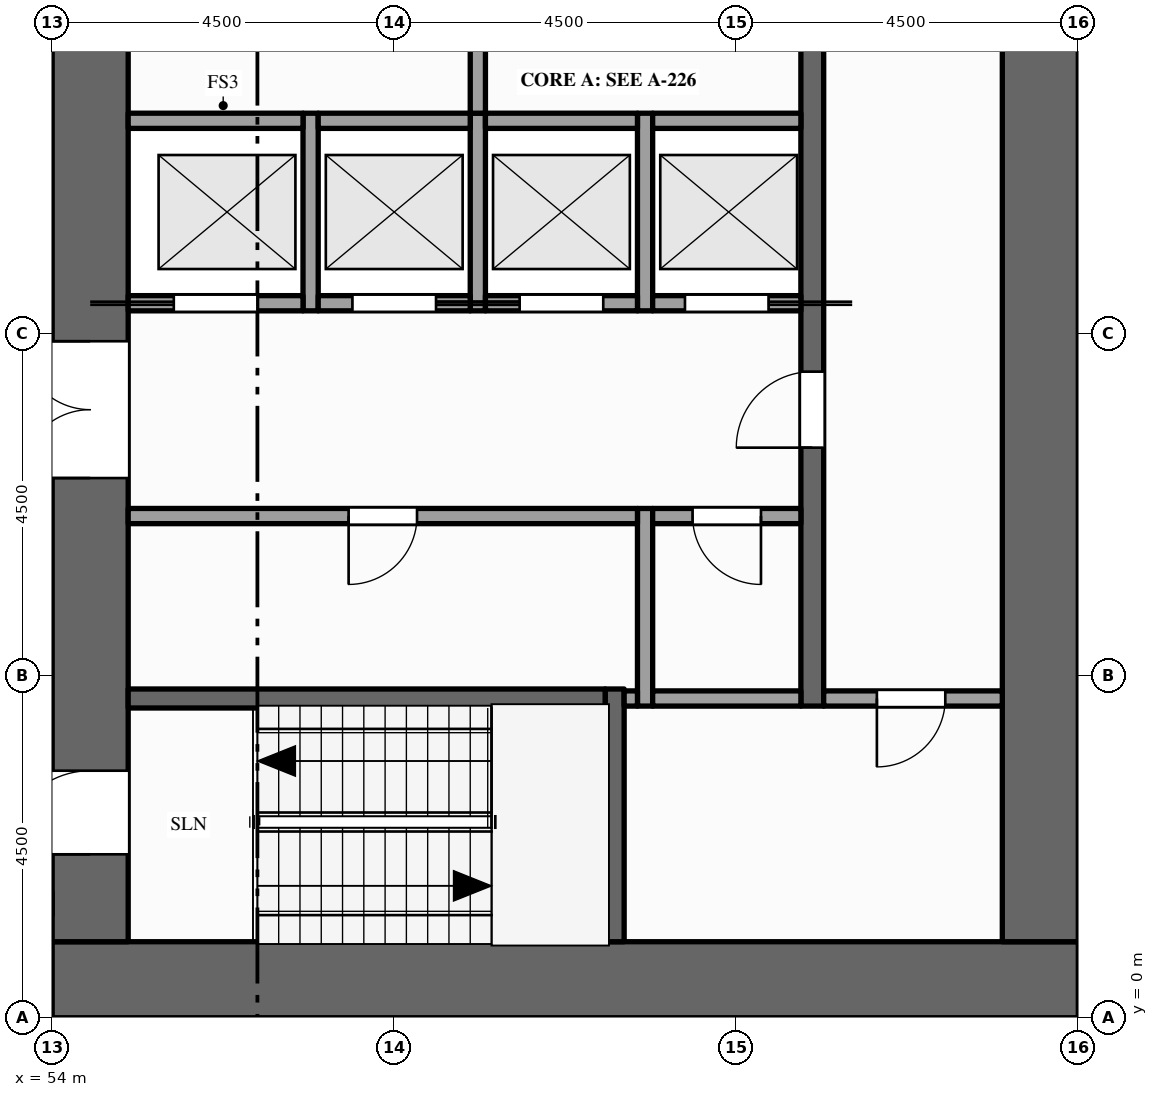
"""IFC4 building model, lengths in metres.
Left out: names, types, materials, properties, quantities, classifications, styles, units other than length and angle.
Written with IfcOpenShell. Run it as: python <this file> out.ifc"""

import sys

from ifc_helpers import new_model, si_unit, direction, frame, frame_2d, origin, place, context, subcontext, project, spatial, rectangle, extrude, element, fill, save


model = new_model("IFC4")
c1 = context("Model", 3, precision=1e-05, world=origin(), true_north=direction((0.0, 1.0)))
c2 = subcontext(c1, "Body", "Model", "MODEL_VIEW")
j1 = project(units=[si_unit("LENGTHUNIT", "METRE"), si_unit("PLANEANGLEUNIT", "RADIAN")], contexts=[c1])
p1 = place(None, origin())
s1 = spatial("IfcSite", under=j1, at=p1, CompositionType="ELEMENT")
p2 = place(p1, origin())
s2 = spatial("IfcBuilding", under=s1, at=p2, CompositionType="ELEMENT")
p3 = place(p2, frame((0.0, 0.0, 143.0)))
s3 = spatial("IfcBuildingStorey", under=s2, at=p3, CompositionType="ELEMENT", Elevation=143.0)
p4 = place(p3, frame((67.5, 0.5, -0.15), z_axis=(0.0, 0.0, 1.0), x_axis=(-1.0, 0.0, 0.0)))
e1 = element("IfcWall", 1, at=p4, inside=s3, PredefinedType="SHEAR", context=c2, shape_type="SweptSolid", body=[
    extrude(rectangle(XDim=13.5, YDim=1.0, at=frame_2d((6.75, 0.0))), origin(), (0.0, 0.0, 1.0), 4.0),
])
p5 = place(p3, frame((54.5, 1.0, -0.15), z_axis=(0.0, 0.0, 1.0), x_axis=(0.0, 1.0, 0.0)))
e2 = element("IfcWall", 2, at=p5, inside=s3, PredefinedType="SHEAR", context=c2, shape_type="SweptSolid", body=[
    extrude(rectangle(XDim=20.5, YDim=1.0, at=frame_2d((10.25, 0.0))), origin(), (0.0, 0.0, 1.0), 4.0),
])
p6 = place(p5, frame((6.1, 0.0, 0.15)))
e3 = element("IfcOpeningElement", 3, at=p6, cuts=e2, PredefinedType="OPENING", context=c2, shape_type="SweptSolid", body=[
    extrude(rectangle(XDim=1.8, YDim=2.1, at=frame_2d((0.9, 1.05))), frame((0.0, 0.51, 0.0), z_axis=(0.0, -1.0, 0.0), x_axis=(1.0, 0.0, 0.0)), (0.0, 0.0, 1.0), 1.02),
])
p7 = place(p5, frame((12.15, 0.0, 0.15)))
e4 = element("IfcOpeningElement", 4, at=p7, cuts=e2, PredefinedType="OPENING", context=c2, shape_type="SweptSolid", body=[
    extrude(rectangle(XDim=1.1, YDim=2.1, at=frame_2d((0.55, 1.05))), frame((0.0, 0.51, 0.0), z_axis=(0.0, -1.0, 0.0), x_axis=(1.0, 0.0, 0.0)), (0.0, 0.0, 1.0), 1.02),
])
p8 = place(p5, frame((1.15, 0.0, 0.15)))
e5 = element("IfcOpeningElement", 5, at=p8, cuts=e2, PredefinedType="OPENING", context=c2, shape_type="SweptSolid", body=[
    extrude(rectangle(XDim=1.1, YDim=2.1, at=frame_2d((0.55, 1.05))), frame((0.0, 0.51, 0.0), z_axis=(0.0, -1.0, 0.0), x_axis=(1.0, 0.0, 0.0)), (0.0, 0.0, 1.0), 1.02),
])
p9 = place(p5, frame((18.35, 0.0, 0.15)))
e6 = element("IfcOpeningElement", 6, at=p9, cuts=e2, PredefinedType="OPENING", context=c2, shape_type="SweptSolid", body=[
    extrude(rectangle(XDim=1.1, YDim=2.1, at=frame_2d((0.55, 1.05))), frame((0.0, 0.51, 0.0), z_axis=(0.0, -1.0, 0.0), x_axis=(1.0, 0.0, 0.0)), (0.0, 0.0, 1.0), 1.02),
])
p10 = place(p3, frame((67.0, 1.0, -0.15), z_axis=(0.0, 0.0, 1.0), x_axis=(0.0, 1.0, 0.0)))
e7 = element("IfcWall", 7, at=p10, inside=s3, PredefinedType="SHEAR", context=c2, shape_type="SweptSolid", body=[
    extrude(rectangle(XDim=20.5, YDim=1.0, at=frame_2d((10.25, 0.0))), origin(), (0.0, 0.0, 1.0), 4.0),
])
for number, where, z_axis, x_axis in (
    (8, (57.4, 9.3, 0.0), (0.0, 0.0, 1.0), (0.0, 1.0, 0.0)),
    (9, (59.6, 9.3, 0.0), (0.0, 0.0, 1.0), (0.0, 1.0, 0.0)),
):
    element("IfcWall", number, at=place(p3, frame(where, z_axis=z_axis, x_axis=x_axis)), inside=s3, PredefinedType="SOLIDWALL", context=c2, shape_type="SweptSolid", body=[
        extrude(rectangle(XDim=2.6, YDim=0.2, at=frame_2d((1.3, 0.0))), origin(), (0.0, 0.0, 1.0), 3.85),
    ])
p11 = place(p3, frame((59.6, 11.9, 0.0), z_axis=(0.0, 0.0, 1.0), x_axis=(0.0, 1.0, 0.0)))
e10 = element("IfcWall", 10, at=p11, inside=s3, PredefinedType="PARTITIONING", context=c2, shape_type="SweptSolid", body=[
    extrude(rectangle(XDim=3.6, YDim=0.2, at=frame_2d((1.8, 0.0))), origin(), (0.0, 0.0, 1.0), 3.85),
])
p12 = place(p11, frame((1.3, 0.0, 0.0)))
e11 = element("IfcOpeningElement", 11, at=p12, cuts=e10, PredefinedType="OPENING", context=c2, shape_type="SweptSolid", body=[
    extrude(rectangle(XDim=1.0, YDim=2.1, at=frame_2d((0.5, 1.05))), frame((0.0, 0.11, 0.0), z_axis=(0.0, -1.0, 0.0), x_axis=(1.0, 0.0, 0.0)), (0.0, 0.0, 1.0), 0.22),
])
p13 = place(p3, frame((61.4, 1.0, 0.0), z_axis=(0.0, 0.0, 1.0), x_axis=(0.0, 1.0, 0.0)))
e12 = element("IfcWall", 12, at=p13, inside=s3, PredefinedType="SHEAR", context=c2, shape_type="SweptSolid", body=[
    extrude(rectangle(XDim=3.325, YDim=0.25, at=frame_2d((1.663, 0.0))), origin(), (0.0, 0.0, 1.0), 3.85),
])
p14 = place(p3, frame((61.8, 4.1, 0.0), z_axis=(0.0, 0.0, 1.0), x_axis=(0.0, 1.0, 0.0)))
e13 = element("IfcWall", 13, at=p14, inside=s3, PredefinedType="PARTITIONING", context=c2, shape_type="SweptSolid", body=[
    extrude(rectangle(XDim=2.6, YDim=0.2, at=frame_2d((1.3, 0.0))), origin(), (0.0, 0.0, 1.0), 3.85),
])
p15 = place(p3, frame((61.8, 9.3, 0.0), z_axis=(0.0, 0.0, 1.0), x_axis=(0.0, 1.0, 0.0)))
e14 = element("IfcWall", 14, at=p15, inside=s3, PredefinedType="SOLIDWALL", context=c2, shape_type="SweptSolid", body=[
    extrude(rectangle(XDim=2.6, YDim=0.2, at=frame_2d((1.3, 0.0))), origin(), (0.0, 0.0, 1.0), 3.85),
])
p16 = place(p3, frame((64.0, 4.1, 0.0), z_axis=(0.0, 0.0, 1.0), x_axis=(0.0, 1.0, 0.0)))
e15 = element("IfcWall", 15, at=p16, inside=s3, PredefinedType="SHEAR", context=c2, shape_type="SweptSolid", body=[
    extrude(rectangle(XDim=14.5, YDim=0.3, at=frame_2d((7.25, 0.0))), origin(), (0.0, 0.0, 1.0), 3.85),
])
p17 = place(p16, frame((3.4, 0.0, 0.0)))
e16 = element("IfcOpeningElement", 16, at=p17, cuts=e15, PredefinedType="OPENING", context=c2, shape_type="SweptSolid", body=[
    extrude(rectangle(XDim=1.0, YDim=2.1, at=frame_2d((0.5, 1.05))), frame((0.0, 0.16, 0.0), z_axis=(0.0, -1.0, 0.0), x_axis=(1.0, 0.0, 0.0)), (0.0, 0.0, 1.0), 0.32),
])
p18 = place(p16, frame((9.1, 0.0, 0.0)))
e17 = element("IfcOpeningElement", 17, at=p18, cuts=e15, PredefinedType="OPENING", context=c2, shape_type="SweptSolid", body=[
    extrude(rectangle(XDim=1.0, YDim=2.1, at=frame_2d((0.5, 1.05))), frame((0.0, 0.16, 0.0), z_axis=(0.0, -1.0, 0.0), x_axis=(1.0, 0.0, 0.0)), (0.0, 0.0, 1.0), 0.32),
])
p19 = place(p3, frame((55.0, 4.2, 0.0), z_axis=(0.0, 0.0, 1.0), x_axis=(1.0, 0.0, 0.0)))
e18 = element("IfcWall", 18, at=p19, inside=s3, PredefinedType="SHEAR", context=c2, shape_type="SweptSolid", body=[
    extrude(rectangle(XDim=6.275, YDim=0.25, at=frame_2d((3.137, 0.0))), origin(), (0.0, 0.0, 1.0), 3.85),
])
p20 = place(p3, frame((61.525, 4.2, 0.0), z_axis=(0.0, 0.0, 1.0), x_axis=(1.0, 0.0, 0.0)))
e19 = element("IfcWall", 19, at=p20, inside=s3, PredefinedType="PARTITIONING", context=c2, shape_type="SweptSolid", body=[
    extrude(rectangle(XDim=0.175, YDim=0.2, at=frame_2d((0.087, 0.0))), origin(), (0.0, 0.0, 1.0), 3.85),
])
p21 = place(p3, frame((61.9, 4.2, 0.0), z_axis=(0.0, 0.0, 1.0), x_axis=(1.0, 0.0, 0.0)))
e20 = element("IfcWall", 20, at=p21, inside=s3, PredefinedType="PARTITIONING", context=c2, shape_type="SweptSolid", body=[
    extrude(rectangle(XDim=1.95, YDim=0.2, at=frame_2d((0.975, 0.0))), origin(), (0.0, 0.0, 1.0), 3.85),
])
p22 = place(p3, frame((64.15, 4.2, 0.0), z_axis=(0.0, 0.0, 1.0), x_axis=(1.0, 0.0, 0.0)))
e21 = element("IfcWall", 21, at=p22, inside=s3, PredefinedType="PARTITIONING", context=c2, shape_type="SweptSolid", body=[
    extrude(rectangle(XDim=2.35, YDim=0.2, at=frame_2d((1.175, 0.0))), origin(), (0.0, 0.0, 1.0), 3.85),
])
p23 = place(p22, frame((0.7, 0.0, 0.0)))
e22 = element("IfcOpeningElement", 22, at=p23, cuts=e21, PredefinedType="OPENING", context=c2, shape_type="SweptSolid", body=[
    extrude(rectangle(XDim=0.9, YDim=2.1, at=frame_2d((0.45, 1.05))), frame((0.0, 0.11, 0.0), z_axis=(0.0, -1.0, 0.0), x_axis=(1.0, 0.0, 0.0)), (0.0, 0.0, 1.0), 0.22),
])
p24 = place(p3, frame((55.0, 6.6, 0.0), z_axis=(0.0, 0.0, 1.0), x_axis=(1.0, 0.0, 0.0)))
e23 = element("IfcWall", 23, at=p24, inside=s3, PredefinedType="PARTITIONING", context=c2, shape_type="SweptSolid", body=[
    extrude(rectangle(XDim=6.7, YDim=0.2, at=frame_2d((3.35, 0.0))), origin(), (0.0, 0.0, 1.0), 3.85),
])
p25 = place(p24, frame((2.9, 0.0, 0.0)))
e24 = element("IfcOpeningElement", 24, at=p25, cuts=e23, PredefinedType="OPENING", context=c2, shape_type="SweptSolid", body=[
    extrude(rectangle(XDim=0.9, YDim=2.1, at=frame_2d((0.45, 1.05))), frame((0.0, 0.11, 0.0), z_axis=(0.0, -1.0, 0.0), x_axis=(1.0, 0.0, 0.0)), (0.0, 0.0, 1.0), 0.22),
])
p26 = place(p3, frame((61.9, 6.6, 0.0), z_axis=(0.0, 0.0, 1.0), x_axis=(1.0, 0.0, 0.0)))
e25 = element("IfcWall", 25, at=p26, inside=s3, PredefinedType="PARTITIONING", context=c2, shape_type="SweptSolid", body=[
    extrude(rectangle(XDim=1.95, YDim=0.2, at=frame_2d((0.975, 0.0))), origin(), (0.0, 0.0, 1.0), 3.85),
])
p27 = place(p26, frame((0.525, 0.0, 0.0)))
e26 = element("IfcOpeningElement", 26, at=p27, cuts=e25, PredefinedType="OPENING", context=c2, shape_type="SweptSolid", body=[
    extrude(rectangle(XDim=0.9, YDim=2.1, at=frame_2d((0.45, 1.05))), frame((0.0, 0.11, 0.0), z_axis=(0.0, -1.0, 0.0), x_axis=(1.0, 0.0, 0.0)), (0.0, 0.0, 1.0), 0.22),
])
p28 = place(p3, frame((55.0, 9.4, 0.0), z_axis=(0.0, 0.0, 1.0), x_axis=(1.0, 0.0, 0.0)))
e27 = element("IfcWall", 27, at=p28, inside=s3, PredefinedType="SOLIDWALL", context=c2, shape_type="SweptSolid", body=[
    extrude(rectangle(XDim=2.3, YDim=0.2, at=frame_2d((1.15, 0.0))), origin(), (0.0, 0.0, 1.0), 3.85),
])
p29 = place(p28, frame((0.6, 0.0, 0.012)))
e28 = element("IfcOpeningElement", 28, at=p29, cuts=e27, PredefinedType="OPENING", context=c2, shape_type="SweptSolid", body=[
    extrude(rectangle(XDim=1.1, YDim=2.1, at=frame_2d((0.55, 1.05))), frame((0.0, 0.11, 0.0), z_axis=(0.0, -1.0, 0.0), x_axis=(1.0, 0.0, 0.0)), (0.0, 0.0, 1.0), 0.22),
])
p30 = place(p3, frame((57.5, 9.4, 0.0), z_axis=(0.0, 0.0, 1.0), x_axis=(1.0, 0.0, 0.0)))
e29 = element("IfcWall", 29, at=p30, inside=s3, PredefinedType="SOLIDWALL", context=c2, shape_type="SweptSolid", body=[
    extrude(rectangle(XDim=2.0, YDim=0.2, at=frame_2d((1.0, 0.0))), origin(), (0.0, 0.0, 1.0), 3.85),
])
p31 = place(p30, frame((0.45, 0.0, 0.012)))
e30 = element("IfcOpeningElement", 30, at=p31, cuts=e29, PredefinedType="OPENING", context=c2, shape_type="SweptSolid", body=[
    extrude(rectangle(XDim=1.1, YDim=2.1, at=frame_2d((0.55, 1.05))), frame((0.0, 0.11, 0.0), z_axis=(0.0, -1.0, 0.0), x_axis=(1.0, 0.0, 0.0)), (0.0, 0.0, 1.0), 0.22),
])
p32 = place(p3, frame((59.7, 9.4, 0.0), z_axis=(0.0, 0.0, 1.0), x_axis=(1.0, 0.0, 0.0)))
e31 = element("IfcWall", 31, at=p32, inside=s3, PredefinedType="SOLIDWALL", context=c2, shape_type="SweptSolid", body=[
    extrude(rectangle(XDim=2.0, YDim=0.2, at=frame_2d((1.0, 0.0))), origin(), (0.0, 0.0, 1.0), 3.85),
])
p33 = place(p32, frame((0.45, 0.0, 0.012)))
e32 = element("IfcOpeningElement", 32, at=p33, cuts=e31, PredefinedType="OPENING", context=c2, shape_type="SweptSolid", body=[
    extrude(rectangle(XDim=1.1, YDim=2.1, at=frame_2d((0.55, 1.05))), frame((0.0, 0.11, 0.0), z_axis=(0.0, -1.0, 0.0), x_axis=(1.0, 0.0, 0.0)), (0.0, 0.0, 1.0), 0.22),
])
p34 = place(p3, frame((61.9, 9.4, 0.0), z_axis=(0.0, 0.0, 1.0), x_axis=(1.0, 0.0, 0.0)))
e33 = element("IfcWall", 33, at=p34, inside=s3, PredefinedType="SOLIDWALL", context=c2, shape_type="SweptSolid", body=[
    extrude(rectangle(XDim=1.95, YDim=0.2, at=frame_2d((0.975, 0.0))), origin(), (0.0, 0.0, 1.0), 3.85),
])
p35 = place(p34, frame((0.425, 0.0, 0.012)))
e34 = element("IfcOpeningElement", 34, at=p35, cuts=e33, PredefinedType="OPENING", context=c2, shape_type="SweptSolid", body=[
    extrude(rectangle(XDim=1.1, YDim=2.1, at=frame_2d((0.55, 1.05))), frame((0.0, 0.11, 0.0), z_axis=(0.0, -1.0, 0.0), x_axis=(1.0, 0.0, 0.0)), (0.0, 0.0, 1.0), 0.22),
])
p36 = place(p3, frame((55.0, 11.8, 0.0), z_axis=(0.0, 0.0, 1.0), x_axis=(1.0, 0.0, 0.0)))
e35 = element("IfcWall", 35, at=p36, inside=s3, PredefinedType="SOLIDWALL", context=c2, shape_type="SweptSolid", body=[
    extrude(rectangle(XDim=2.3, YDim=0.2, at=frame_2d((1.15, 0.0))), origin(), (0.0, 0.0, 1.0), 3.85),
])
for number, where, z_axis, x_axis in (
    (36, (57.5, 11.8, 0.0), (0.0, 0.0, 1.0), (1.0, 0.0, 0.0)),
    (37, (59.7, 11.8, 0.0), (0.0, 0.0, 1.0), (1.0, 0.0, 0.0)),
):
    element("IfcWall", number, at=place(p3, frame(where, z_axis=z_axis, x_axis=x_axis)), inside=s3, PredefinedType="SOLIDWALL", context=c2, shape_type="SweptSolid", body=[
        extrude(rectangle(XDim=2.0, YDim=0.2, at=frame_2d((1.0, 0.0))), origin(), (0.0, 0.0, 1.0), 3.85),
    ])
p37 = place(p3, frame((61.9, 11.8, 0.0), z_axis=(0.0, 0.0, 1.0), x_axis=(1.0, 0.0, 0.0)))
e38 = element("IfcWall", 38, at=p37, inside=s3, PredefinedType="SOLIDWALL", context=c2, shape_type="SweptSolid", body=[
    extrude(rectangle(XDim=1.95, YDim=0.2, at=frame_2d((0.975, 0.0))), origin(), (0.0, 0.0, 1.0), 3.85),
])
p38 = place(p29, origin())
e39 = element("IfcDoor", 39, at=p38, inside=s3, OperationType="SLIDING_TO_LEFT", PredefinedType="DOOR", context=c2, shape_type="SweptSolid", body=[
    extrude(rectangle(XDim=1.1, YDim=2.1, at=frame_2d((0.55, 1.05))), frame((0.0, 0.025, 0.0), z_axis=(0.0, -1.0, 0.0), x_axis=(1.0, 0.0, 0.0)), (0.0, 0.0, 1.0), 0.05),
])
fill(e28, e39)
p39 = place(p31, origin())
e40 = element("IfcDoor", 40, at=p39, inside=s3, OperationType="SLIDING_TO_RIGHT", PredefinedType="DOOR", context=c2, shape_type="SweptSolid", body=[
    extrude(rectangle(XDim=1.1, YDim=2.1, at=frame_2d((0.55, 1.05))), frame((0.0, 0.025, 0.0), z_axis=(0.0, -1.0, 0.0), x_axis=(1.0, 0.0, 0.0)), (0.0, 0.0, 1.0), 0.05),
])
fill(e30, e40)
p40 = place(p33, origin())
e41 = element("IfcDoor", 41, at=p40, inside=s3, OperationType="SLIDING_TO_LEFT", PredefinedType="DOOR", context=c2, shape_type="SweptSolid", body=[
    extrude(rectangle(XDim=1.1, YDim=2.1, at=frame_2d((0.55, 1.05))), frame((0.0, 0.025, 0.0), z_axis=(0.0, -1.0, 0.0), x_axis=(1.0, 0.0, 0.0)), (0.0, 0.0, 1.0), 0.05),
])
fill(e32, e41)
p41 = place(p35, origin())
e42 = element("IfcDoor", 42, at=p41, inside=s3, OperationType="SLIDING_TO_RIGHT", PredefinedType="DOOR", context=c2, shape_type="SweptSolid", body=[
    extrude(rectangle(XDim=1.1, YDim=2.1, at=frame_2d((0.55, 1.05))), frame((0.0, 0.025, 0.0), z_axis=(0.0, -1.0, 0.0), x_axis=(1.0, 0.0, 0.0)), (0.0, 0.0, 1.0), 0.05),
])
fill(e34, e42)
p42 = place(p6, origin())
e43 = element("IfcDoor", 43, at=p42, inside=s3, OperationType="DOUBLE_DOOR_SINGLE_SWING", PredefinedType="DOOR", context=c2, shape_type="SweptSolid", body=[
    extrude(rectangle(XDim=1.8, YDim=2.1, at=frame_2d((0.9, 1.05))), frame((0.0, 0.025, 0.0), z_axis=(0.0, -1.0, 0.0), x_axis=(1.0, 0.0, 0.0)), (0.0, 0.0, 1.0), 0.05),
])
fill(e3, e43)
p43 = place(p17, origin())
e44 = element("IfcDoor", 44, at=p43, inside=s3, OperationType="SINGLE_SWING_LEFT", PredefinedType="DOOR", context=c2, shape_type="SweptSolid", body=[
    extrude(rectangle(XDim=1.0, YDim=2.1, at=frame_2d((0.5, 1.05))), frame((0.0, 0.025, 0.0), z_axis=(0.0, -1.0, 0.0), x_axis=(1.0, 0.0, 0.0)), (0.0, 0.0, 1.0), 0.05),
])
fill(e16, e44)
p44 = place(p8, origin())
e45 = element("IfcDoor", 45, at=p44, inside=s3, OperationType="SINGLE_SWING_LEFT", PredefinedType="DOOR", context=c2, shape_type="SweptSolid", body=[
    extrude(rectangle(XDim=1.1, YDim=2.1, at=frame_2d((0.55, 1.05))), frame((0.0, 0.025, 0.0), z_axis=(0.0, -1.0, 0.0), x_axis=(1.0, 0.0, 0.0)), (0.0, 0.0, 1.0), 0.05),
])
fill(e5, e45)
p45 = place(p23, origin())
e46 = element("IfcDoor", 46, at=p45, inside=s3, OperationType="SINGLE_SWING_LEFT", PredefinedType="DOOR", context=c2, shape_type="SweptSolid", body=[
    extrude(rectangle(XDim=0.9, YDim=2.1, at=frame_2d((0.45, 1.05))), frame((0.0, 0.025, 0.0), z_axis=(0.0, -1.0, 0.0), x_axis=(1.0, 0.0, 0.0)), (0.0, 0.0, 1.0), 0.05),
])
fill(e22, e46)
p46 = place(p25, origin())
e47 = element("IfcDoor", 47, at=p46, inside=s3, OperationType="SINGLE_SWING_LEFT", PredefinedType="DOOR", context=c2, shape_type="SweptSolid", body=[
    extrude(rectangle(XDim=0.9, YDim=2.1, at=frame_2d((0.45, 1.05))), frame((0.0, 0.025, 0.0), z_axis=(0.0, -1.0, 0.0), x_axis=(1.0, 0.0, 0.0)), (0.0, 0.0, 1.0), 0.05),
])
fill(e24, e47)
p47 = place(p27, origin())
e48 = element("IfcDoor", 48, at=p47, inside=s3, OperationType="SINGLE_SWING_RIGHT", PredefinedType="DOOR", context=c2, shape_type="SweptSolid", body=[
    extrude(rectangle(XDim=0.9, YDim=2.1, at=frame_2d((0.45, 1.05))), frame((0.0, 0.025, 0.0), z_axis=(0.0, -1.0, 0.0), x_axis=(1.0, 0.0, 0.0)), (0.0, 0.0, 1.0), 0.05),
])
fill(e26, e48)
save(model, sys.argv[1])
